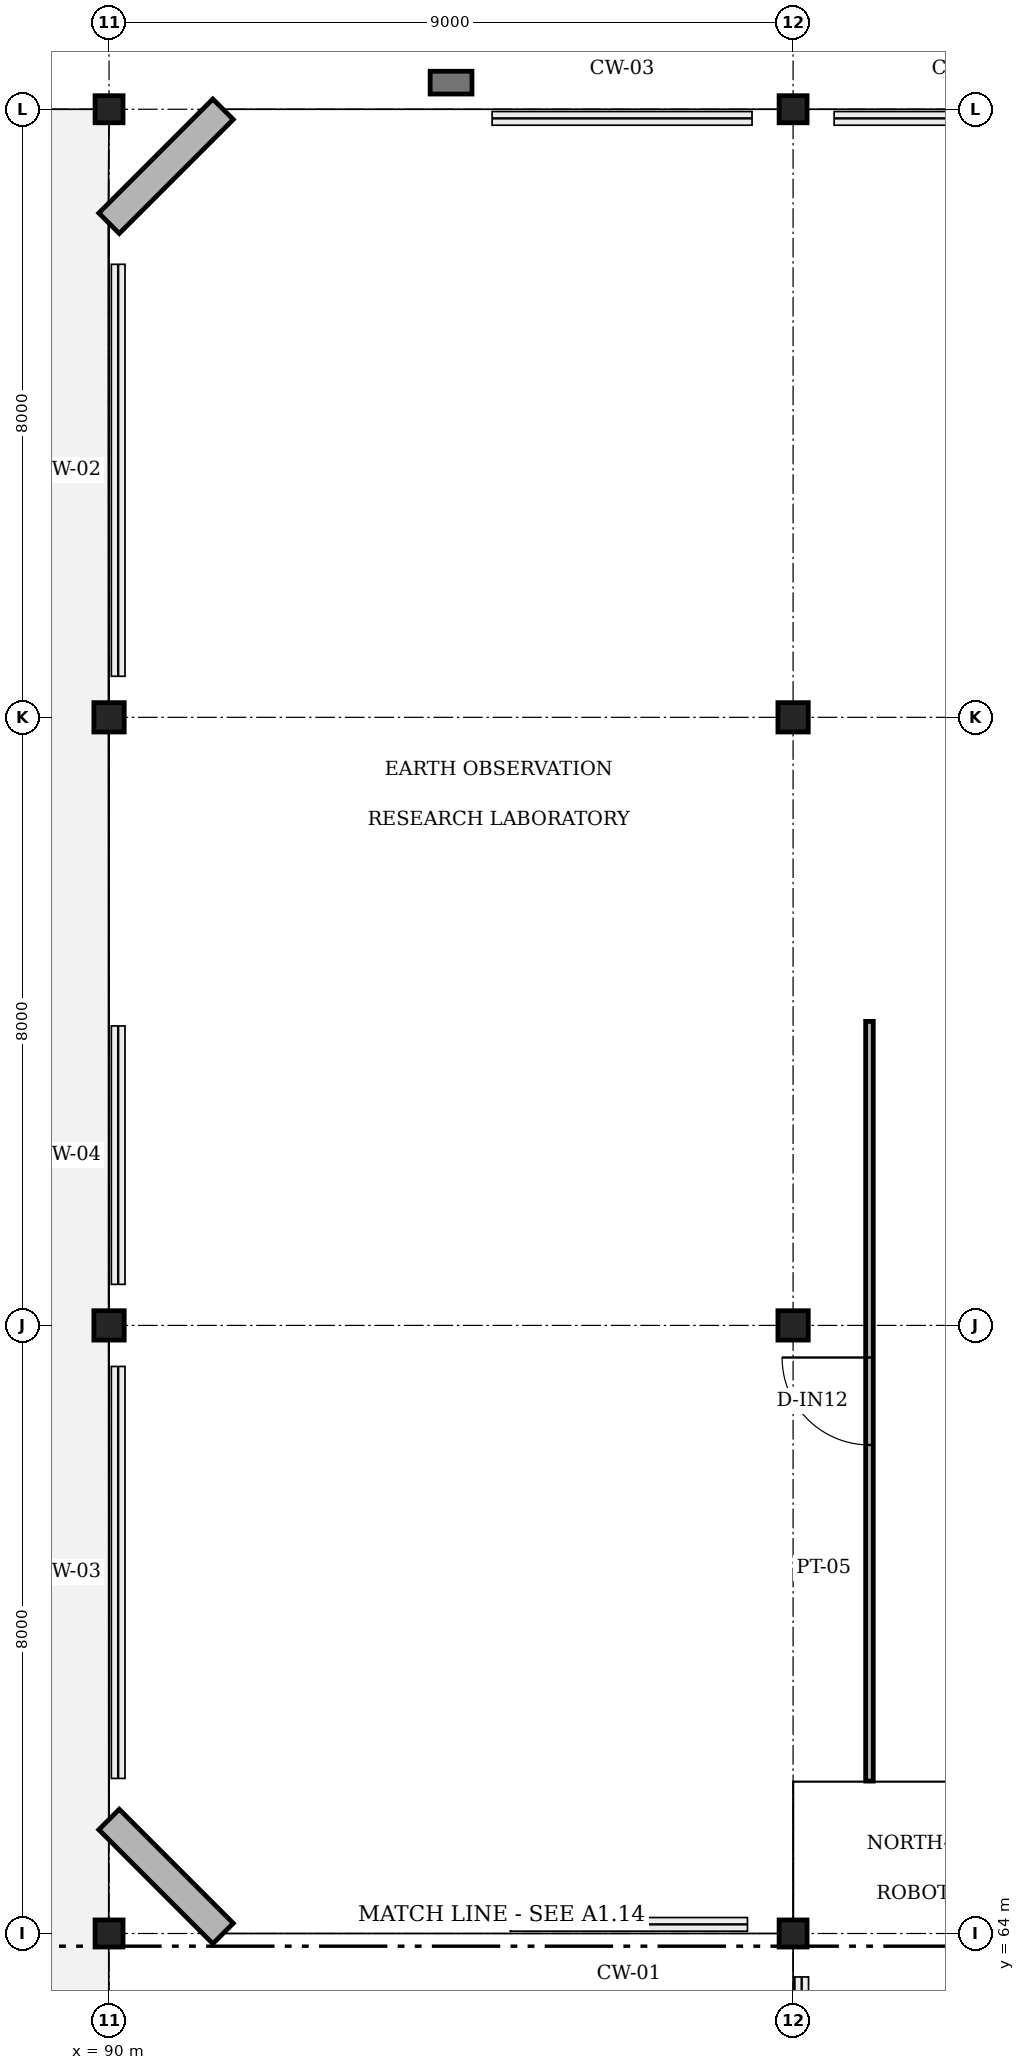
"""IFC4 building model, lengths in metres.
Left out: names, types, materials, properties, quantities, classifications, styles, units other than length and angle.
Written with IfcOpenShell. Run it as: python <this file> out.ifc"""

import sys

from ifc_helpers import new_model, si_unit, direction, frame, frame_2d, origin, origin_2d, place, context, subcontext, project, spatial, rectangle, i_section, extrude, element, fill, save


model = new_model("IFC4")
c1 = context("Model", 3, precision=1e-05, world=origin(), true_north=direction((0.0, 1.0)))
c2 = subcontext(c1, "Body", "Model", "MODEL_VIEW")
j1 = project(units=[si_unit("LENGTHUNIT", "METRE"), si_unit("PLANEANGLEUNIT", "RADIAN")], contexts=[c1])
p1 = place(None, origin())
s1 = spatial("IfcSite", under=j1, at=p1, CompositionType="ELEMENT")
p2 = place(p1, origin())
s2 = spatial("IfcBuilding", under=s1, at=p2, CompositionType="ELEMENT")
p3 = place(p2, origin())
s3 = spatial("IfcBuildingStorey", under=s2, at=p3, CompositionType="ELEMENT", Elevation=0.0)
p4 = place(p3, frame((90.0, 64.0, 0.0), z_axis=(0.0, 0.0, 1.0), x_axis=(1.0, 0.0, 0.0)))
e1 = element("IfcColumn", 1, at=p4, inside=s3, PredefinedType="COLUMN", context=c2, shape_type="SweptSolid", body=[
    extrude(i_section(OverallWidth=0.368, OverallDepth=0.356, WebThickness=0.011, FlangeThickness=0.018, FilletRadius=0.015, at=origin_2d()), origin(), (0.0, 0.0, 1.0), 5.4),
])
for number, where, z_axis, x_axis in (
    (2, (90.0, 72.0, 0.0), (0.0, 0.0, 1.0), (1.0, 0.0, 0.0)),
    (3, (90.0, 80.0, 0.0), (0.0, 0.0, 1.0), (1.0, 0.0, 0.0)),
):
    element("IfcColumn", number, at=place(p3, frame(where, z_axis=z_axis, x_axis=x_axis)), inside=s3, PredefinedType="COLUMN", context=c2, shape_type="SweptSolid", body=[
        extrude(i_section(OverallWidth=0.399, OverallDepth=0.386, WebThickness=0.021, FlangeThickness=0.033, FilletRadius=0.015, at=origin_2d()), origin(), (0.0, 0.0, 1.0), 5.4),
    ])
for number, where, z_axis, x_axis in (
    (4, (90.0, 88.0, 0.0), (0.0, 0.0, 1.0), (1.0, 0.0, 0.0)),
    (5, (99.0, 64.0, 0.0), (0.0, 0.0, 1.0), (1.0, 0.0, 0.0)),
):
    element("IfcColumn", number, at=place(p3, frame(where, z_axis=z_axis, x_axis=x_axis)), inside=s3, PredefinedType="COLUMN", context=c2, shape_type="SweptSolid", body=[
        extrude(i_section(OverallWidth=0.368, OverallDepth=0.356, WebThickness=0.011, FlangeThickness=0.018, FilletRadius=0.015, at=origin_2d()), origin(), (0.0, 0.0, 1.0), 5.4),
    ])
for number, where, z_axis, x_axis in (
    (6, (99.0, 72.0, 0.0), (0.0, 0.0, 1.0), (1.0, 0.0, 0.0)),
    (7, (99.0, 80.0, 0.0), (0.0, 0.0, 1.0), (1.0, 0.0, 0.0)),
):
    element("IfcColumn", number, at=place(p3, frame(where, z_axis=z_axis, x_axis=x_axis)), inside=s3, PredefinedType="COLUMN", context=c2, shape_type="SweptSolid", body=[
        extrude(i_section(OverallWidth=0.399, OverallDepth=0.386, WebThickness=0.021, FlangeThickness=0.033, FilletRadius=0.015, at=origin_2d()), origin(), (0.0, 0.0, 1.0), 5.4),
    ])
p5 = place(p3, frame((99.0, 88.0, 0.0), z_axis=(0.0, 0.0, 1.0), x_axis=(1.0, 0.0, 0.0)))
e8 = element("IfcColumn", 8, at=p5, inside=s3, PredefinedType="COLUMN", context=c2, shape_type="SweptSolid", body=[
    extrude(i_section(OverallWidth=0.368, OverallDepth=0.356, WebThickness=0.011, FlangeThickness=0.018, FilletRadius=0.015, at=origin_2d()), origin(), (0.0, 0.0, 1.0), 5.4),
])
p6 = place(p3, frame((94.5, 88.35, 0.0), z_axis=(0.0, 0.0, 1.0), x_axis=(1.0, 0.0, 0.0)))
e9 = element("IfcColumn", 9, at=p6, inside=s3, PredefinedType="PILASTER", context=c2, shape_type="SweptSolid", body=[
    extrude(rectangle(XDim=0.55, YDim=0.3, at=origin_2d()), origin(), (0.0, 0.0, 1.0), 5.4),
])
p7 = place(p3, frame((91.5, 64.0, 0.0), z_axis=(0.0, 0.0, 1.0), x_axis=(-0.707106781187, 0.707106781187, 0.0)))
e10 = element("IfcWall", 10, at=p7, inside=s3, PredefinedType="SOLIDWALL", context=c2, shape_type="SweptSolid", body=[
    extrude(rectangle(XDim=2.121, YDim=0.38, at=frame_2d((1.061, 0.0))), origin(), (0.0, 0.0, 1.0), 4.308),
])
p8 = place(p3, frame((90.0, 86.5, 0.0), z_axis=(0.0, 0.0, 1.0), x_axis=(0.707106781187, 0.707106781187, 0.0)))
e11 = element("IfcWall", 11, at=p8, inside=s3, PredefinedType="SOLIDWALL", context=c2, shape_type="SweptSolid", body=[
    extrude(rectangle(XDim=2.121, YDim=0.38, at=frame_2d((1.061, 0.0))), origin(), (0.0, 0.0, 1.0), 4.402),
])
p9 = place(p3, frame((100.005, 66.005, 0.0), z_axis=(0.0, 0.0, 1.0), x_axis=(0.0, 1.0, 0.0)))
e12 = element("IfcWall", 12, at=p9, inside=s3, PredefinedType="PARTITIONING", context=c2, shape_type="SweptSolid", body=[
    extrude(rectangle(XDim=9.995, YDim=0.1, at=frame_2d((4.998, 0.0))), origin(), (0.0, 0.0, 1.0), 3.15),
])
p10 = place(p9, frame((4.423, 0.0, 0.0)))
e13 = element("IfcOpeningElement", 13, at=p10, cuts=e12, PredefinedType="OPENING", context=c2, shape_type="SweptSolid", body=[
    extrude(rectangle(XDim=1.15, YDim=2.15, at=frame_2d((0.575, 1.075))), frame((0.0, 0.06, 0.0), z_axis=(0.0, -1.0, 0.0), x_axis=(1.0, 0.0, 0.0)), (0.0, 0.0, 1.0), 0.12),
])
p11 = place(p10, origin())
e14 = element("IfcDoor", 14, at=p11, inside=s3, OperationType="SINGLE_SWING_RIGHT", PredefinedType="DOOR", context=c2, shape_type="SweptSolid", body=[
    extrude(rectangle(XDim=1.15, YDim=2.15, at=frame_2d((0.575, 1.075))), frame((0.0, 0.025, 0.0), z_axis=(0.0, -1.0, 0.0), x_axis=(1.0, 0.0, 0.0)), (0.0, 0.0, 1.0), 0.05),
])
fill(e13, e14)
save(model, sys.argv[1])
